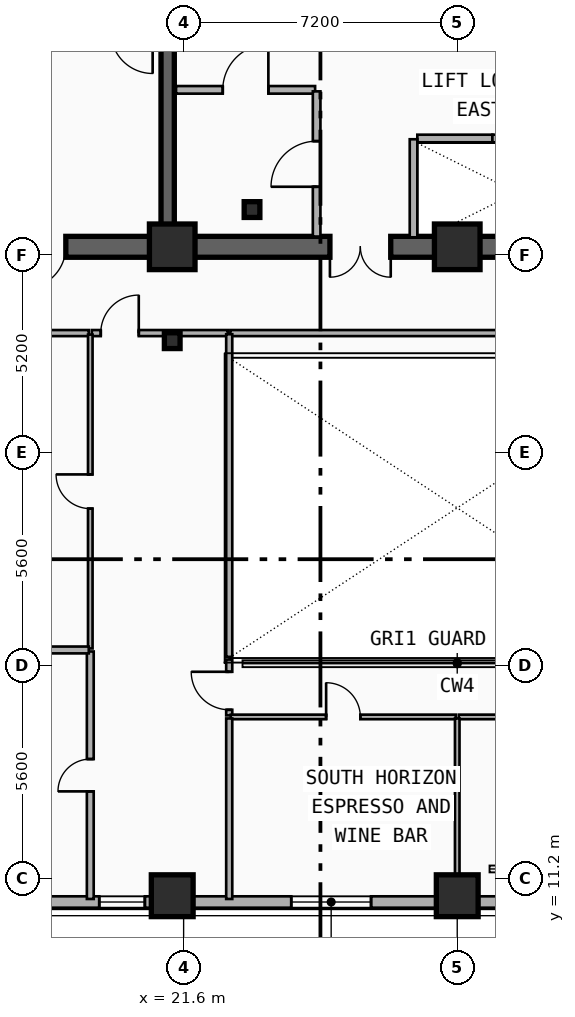
"""IFC4 building model, lengths in metres.
Left out: names, types, materials, properties, quantities, classifications, styles, units other than length and angle.
Written with IfcOpenShell. Run it as: python <this file> out.ifc"""

import sys

from ifc_helpers import new_model, si_unit, direction, frame, frame_2d, origin, origin_2d, place, context, subcontext, project, spatial, rectangle, i_section, extrude, element, fill, save


model = new_model("IFC4")
c1 = context("Model", 3, precision=1e-05, world=origin(), true_north=direction((0.0, 1.0)))
c2 = subcontext(c1, "Body", "Model", "MODEL_VIEW")
j1 = project(units=[si_unit("LENGTHUNIT", "METRE"), si_unit("PLANEANGLEUNIT", "RADIAN")], contexts=[c1])
p1 = place(None, origin())
s1 = spatial("IfcSite", under=j1, at=p1, CompositionType="ELEMENT")
p2 = place(p1, origin())
s2 = spatial("IfcBuilding", under=s1, at=p2, CompositionType="ELEMENT")
p3 = place(p2, frame((0.0, 0.0, 169.65)))
s3 = spatial("IfcBuildingStorey", under=s2, at=p3, CompositionType="ELEMENT", Elevation=169.65)
p4 = place(p3, frame((21.18, 27.82, 0.0), z_axis=(0.0, 0.0, 1.0), x_axis=(-1.0, 0.0, 0.0)))
e1 = element("IfcWall", 1, at=p4, inside=s3, PredefinedType="SHEAR", context=c2, shape_type="SweptSolid", body=[
    extrude(rectangle(XDim=9.03, YDim=0.55, at=frame_2d((4.515, 0.0))), origin(), (0.0, 0.0, 1.0), 3.55),
])
p5 = place(p4, frame((2.68, 0.0, 0.0)))
e2 = element("IfcOpeningElement", 2, at=p5, cuts=e1, PredefinedType="OPENING", context=c2, shape_type="SweptSolid", body=[
    extrude(rectangle(XDim=1.1, YDim=2.15, at=frame_2d((0.55, 1.075))), frame((0.0, 0.285, 0.0), z_axis=(0.0, -1.0, 0.0), x_axis=(1.0, 0.0, 0.0)), (0.0, 0.0, 1.0), 0.57),
])
p6 = place(p3, frame((33.15, 27.82, 0.0), z_axis=(0.0, 0.0, 1.0), x_axis=(-1.0, 0.0, 0.0)))
e3 = element("IfcWall", 3, at=p6, inside=s3, PredefinedType="SHEAR", context=c2, shape_type="SweptSolid", body=[
    extrude(rectangle(XDim=11.97, YDim=0.55, at=frame_2d((5.985, 0.0))), origin(), (0.0, 0.0, 1.0), 3.55),
])
p7 = place(p6, frame((6.1, 0.0, 0.0)))
e4 = element("IfcOpeningElement", 4, at=p7, cuts=e3, PredefinedType="OPENING", context=c2, shape_type="SweptSolid", body=[
    extrude(rectangle(XDim=1.6, YDim=2.2, at=frame_2d((0.8, 1.1))), frame((0.0, 0.285, 0.0), z_axis=(0.0, -1.0, 0.0), x_axis=(1.0, 0.0, 0.0)), (0.0, 0.0, 1.0), 0.57),
])
p8 = place(p3, frame((21.18, 28.095, 0.0), z_axis=(0.0, 0.0, 1.0), x_axis=(0.0, 1.0, 0.0)))
e5 = element("IfcWall", 5, at=p8, inside=s3, PredefinedType="SHEAR", context=c2, shape_type="SweptSolid", body=[
    extrude(rectangle(XDim=8.68, YDim=0.35, at=frame_2d((4.34, 0.0))), origin(), (0.0, 0.0, 1.0), 3.55),
])
p9 = place(p3, frame((23.4, 28.8, 0.0), z_axis=(0.0, 0.0, 1.0), x_axis=(1.0, 0.0, 0.0)))
e6 = element("IfcColumn", 6, at=p9, inside=s3, PredefinedType="COLUMN", context=c2, shape_type="SweptSolid", body=[
    extrude(i_section(OverallWidth=0.413, OverallDepth=0.415, WebThickness=0.03, FlangeThickness=0.047, FilletRadius=0.015, at=origin_2d()), origin(), (0.0, 0.0, 1.0), 3.55),
])
for number, where, z_axis, x_axis in (
    (7, (21.3, 27.82, 0.0), (0.0, 0.0, 1.0), (1.0, 0.0, 0.0)),
    (8, (28.8, 27.82, 0.0), (0.0, 0.0, 1.0), (1.0, 0.0, 0.0)),
):
    element("IfcColumn", number, at=place(p3, frame(where, z_axis=z_axis, x_axis=x_axis)), inside=s3, PredefinedType="COLUMN", context=c2, shape_type="SweptSolid", body=[
        extrude(rectangle(XDim=1.2, YDim=1.2, at=origin_2d()), origin(), (0.0, 0.0, 1.0), 3.55),
    ])
p10 = place(p3, frame((21.3, 25.35, 0.0), z_axis=(0.0, 0.0, 1.0), x_axis=(1.0, 0.0, 0.0)))
e9 = element("IfcColumn", 9, at=p10, inside=s3, PredefinedType="COLUMN", context=c2, shape_type="SweptSolid", body=[
    extrude(i_section(OverallWidth=0.413, OverallDepth=0.415, WebThickness=0.03, FlangeThickness=0.047, FilletRadius=0.015, at=origin_2d()), origin(), (0.0, 0.0, 1.0), 3.55),
])
for number, where, z_axis, x_axis in (
    (10, (21.3, 10.854, 0.0), (0.0, -0.09, 0.996), (1.0, 0.0, 0.0)),
    (11, (28.8, 10.854, 0.0), (0.0, -0.09, 0.996), (1.0, 0.0, 0.0)),
):
    element("IfcColumn", number, at=place(p3, frame(where, z_axis=z_axis, x_axis=x_axis)), inside=s3, PredefinedType="COLUMN", context=c2, shape_type="SweptSolid", body=[
        extrude(rectangle(XDim=1.1, YDim=1.1, at=origin_2d()), origin(), (0.0, 0.0, 1.0), 3.565),
    ])
p11 = place(p3, frame((48.0, 10.58, 0.0), z_axis=(0.0, 0.0, 1.0), x_axis=(-1.0, 0.0, 0.0)))
e12 = element("IfcWall", 12, at=p11, inside=s3, PredefinedType="SOLIDWALL", context=c2, shape_type="SweptSolid", body=[
    extrude(rectangle(XDim=38.4, YDim=0.3, at=frame_2d((19.2, 0.0))), origin(), (0.0, 0.0, 1.0), 2.91),
])
p12 = place(p11, frame((33.665, 0.0, 1.22)))
e13 = element("IfcOpeningElement", 13, at=p12, cuts=e12, PredefinedType="OPENING", context=c2, shape_type="SweptSolid", body=[
    extrude(rectangle(XDim=1.2, YDim=1.5, at=frame_2d((0.6, 0.75))), frame((0.0, 0.16, 0.0), z_axis=(0.0, -1.0, 0.0), x_axis=(1.0, 0.0, 0.0)), (0.0, 0.0, 1.0), 0.32),
])
p13 = place(p11, frame((21.468, 0.0, 0.63)))
e14 = element("IfcOpeningElement", 14, at=p13, cuts=e12, PredefinedType="OPENING", context=c2, shape_type="SweptSolid", body=[
    extrude(rectangle(XDim=2.1, YDim=2.1, at=frame_2d((1.05, 1.05))), frame((0.0, 0.16, 0.0), z_axis=(0.0, -1.0, 0.0), x_axis=(1.0, 0.0, 0.0)), (0.0, 0.0, 1.0), 0.32),
])
p14 = place(p11, frame((14.375, 0.0, 0.63)))
e15 = element("IfcOpeningElement", 15, at=p14, cuts=e12, PredefinedType="OPENING", context=c2, shape_type="SweptSolid", body=[
    extrude(rectangle(XDim=2.1, YDim=2.1, at=frame_2d((1.05, 1.05))), frame((0.0, 0.16, 0.0), z_axis=(0.0, -1.0, 0.0), x_axis=(1.0, 0.0, 0.0)), (0.0, 0.0, 1.0), 0.32),
])
p15 = place(p11, frame((3.535, 0.0, 0.65)))
e16 = element("IfcOpeningElement", 16, at=p15, cuts=e12, PredefinedType="OPENING", context=c2, shape_type="SweptSolid", body=[
    extrude(rectangle(XDim=1.2, YDim=1.5, at=frame_2d((0.6, 0.75))), frame((0.0, 0.16, 0.0), z_axis=(0.0, -1.0, 0.0), x_axis=(1.0, 0.0, 0.0)), (0.0, 0.0, 1.0), 0.32),
])
p16 = place(p11, frame((27.42, 0.0, 0.75)))
e17 = element("IfcOpeningElement", 17, at=p16, cuts=e12, PredefinedType="OPENING", context=c2, shape_type="SweptSolid", body=[
    extrude(rectangle(XDim=1.2, YDim=1.5, at=frame_2d((0.6, 0.75))), frame((0.0, 0.16, 0.0), z_axis=(0.0, -1.0, 0.0), x_axis=(1.0, 0.0, 0.0)), (0.0, 0.0, 1.0), 0.32),
])
p17 = place(p3, frame((27.75, 30.67, 0.0), z_axis=(0.0, 0.0, 1.0), x_axis=(1.0, 0.0, 0.0)))
e18 = element("IfcWall", 18, at=p17, inside=s3, PredefinedType="PARTITIONING", context=c2, shape_type="SweptSolid", body=[
    extrude(rectangle(XDim=1.975, YDim=0.2, at=frame_2d((0.988, 0.0))), origin(), (0.0, 0.0, 1.0), 2.36),
])
p18 = place(p3, frame((27.65, 28.07, 0.0), z_axis=(0.0, 0.0, 1.0), x_axis=(0.0, 1.0, 0.0)))
e19 = element("IfcWall", 19, at=p18, inside=s3, PredefinedType="PARTITIONING", context=c2, shape_type="SweptSolid", body=[
    extrude(rectangle(XDim=2.58, YDim=0.2, at=frame_2d((1.29, 0.0))), origin(), (0.0, 0.0, 1.0), 2.36),
])
p19 = place(p3, frame((29.725, 30.67, 0.0), z_axis=(0.0, 0.0, 1.0), x_axis=(1.0, 0.0, 0.0)))
e20 = element("IfcWall", 20, at=p19, inside=s3, PredefinedType="PARTITIONING", context=c2, shape_type="SweptSolid", body=[
    extrude(rectangle(XDim=2.05, YDim=0.2, at=frame_2d((1.025, 0.0))), origin(), (0.0, 0.0, 1.0), 2.67),
])
p20 = place(p3, frame((21.4, 31.95, 0.0), z_axis=(0.0, 0.0, 1.0), x_axis=(1.0, 0.0, 0.0)))
e21 = element("IfcWall", 21, at=p20, inside=s3, PredefinedType="PARTITIONING", context=c2, shape_type="SweptSolid", body=[
    extrude(rectangle(XDim=3.66, YDim=0.2, at=frame_2d((1.83, 0.0))), origin(), (0.0, 0.0, 1.0), 2.36),
])
p21 = place(p20, frame((1.23, 0.0, 0.0)))
e22 = element("IfcOpeningElement", 22, at=p21, cuts=e21, PredefinedType="OPENING", context=c2, shape_type="SweptSolid", body=[
    extrude(rectangle(XDim=1.2, YDim=2.15, at=frame_2d((0.6, 1.075))), frame((0.0, 0.11, 0.0), z_axis=(0.0, -1.0, 0.0), x_axis=(1.0, 0.0, 0.0)), (0.0, 0.0, 1.0), 0.22),
])
p22 = place(p3, frame((25.1, 28.09, 0.0), z_axis=(0.0, 0.0, 1.0), x_axis=(0.0, 1.0, 0.0)))
e23 = element("IfcWall", 23, at=p22, inside=s3, PredefinedType="PARTITIONING", context=c2, shape_type="SweptSolid", body=[
    extrude(rectangle(XDim=3.82, YDim=0.2, at=frame_2d((1.91, 0.0))), origin(), (0.0, 0.0, 1.0), 2.67),
])
p23 = place(p22, frame((1.31, 0.0, 0.0)))
e24 = element("IfcOpeningElement", 24, at=p23, cuts=e23, PredefinedType="OPENING", context=c2, shape_type="SweptSolid", body=[
    extrude(rectangle(XDim=1.2, YDim=2.15, at=frame_2d((0.6, 1.075))), frame((0.0, 0.11, 0.0), z_axis=(0.0, -1.0, 0.0), x_axis=(1.0, 0.0, 0.0)), (0.0, 0.0, 1.0), 0.22),
])
p24 = place(p3, frame((19.184, 25.55, 0.0), z_axis=(0.0, 0.0, 1.0), x_axis=(1.0, 0.0, 0.0)))
e25 = element("IfcWall", 25, at=p24, inside=s3, PredefinedType="PARTITIONING", context=c2, shape_type="SweptSolid", body=[
    extrude(rectangle(XDim=3.576, YDim=0.16, at=frame_2d((1.788, 0.0))), origin(), (0.0, 0.0, 1.0), 2.36),
])
p25 = place(p24, frame((0.236, 0.0, 0.0)))
e26 = element("IfcOpeningElement", 26, at=p25, cuts=e25, PredefinedType="OPENING", context=c2, shape_type="SweptSolid", body=[
    extrude(rectangle(XDim=1.0, YDim=2.15, at=frame_2d((0.5, 1.075))), frame((0.0, 0.09, 0.0), z_axis=(0.0, -1.0, 0.0), x_axis=(1.0, 0.0, 0.0)), (0.0, 0.0, 1.0), 0.18),
])
p26 = place(p3, frame((17.434, 25.55, 0.0), z_axis=(0.0, 0.0, 1.0), x_axis=(1.0, 0.0, 0.0)))
e27 = element("IfcWall", 27, at=p26, inside=s3, PredefinedType="PARTITIONING", context=c2, shape_type="SweptSolid", body=[
    extrude(rectangle(XDim=1.67, YDim=0.16, at=frame_2d((0.835, 0.0))), origin(), (0.0, 0.0, 1.0), 3.29),
])
p27 = place(p3, frame((22.8, 15.49, 0.0), z_axis=(0.0, 0.0, 1.0), x_axis=(0.0, 1.0, 0.0)))
e28 = element("IfcWall", 28, at=p27, inside=s3, PredefinedType="PARTITIONING", context=c2, shape_type="SweptSolid", body=[
    extrude(rectangle(XDim=1.47, YDim=0.16, at=frame_2d((0.735, 0.0))), origin(), (0.0, 0.0, 1.0), 2.73),
])
p28 = place(p27, frame((0.148, 0.0, 0.0)))
e29 = element("IfcOpeningElement", 29, at=p28, cuts=e28, PredefinedType="OPENING", context=c2, shape_type="SweptSolid", body=[
    extrude(rectangle(XDim=1.0, YDim=2.15, at=frame_2d((0.5, 1.075))), frame((0.0, 0.09, 0.0), z_axis=(0.0, -1.0, 0.0), x_axis=(1.0, 0.0, 0.0)), (0.0, 0.0, 1.0), 0.18),
])
p29 = place(p3, frame((22.84, 15.45, 0.0), z_axis=(0.0, 0.0, 1.0), x_axis=(1.0, 0.0, 0.0)))
e30 = element("IfcWall", 30, at=p29, inside=s3, PredefinedType="PARTITIONING", context=c2, shape_type="SweptSolid", body=[
    extrude(rectangle(XDim=5.92, YDim=0.12, at=frame_2d((2.96, 0.0))), origin(), (0.0, 0.0, 1.0), 2.36),
])
p30 = place(p29, frame((2.51, 0.0, 0.0)))
e31 = element("IfcOpeningElement", 31, at=p30, cuts=e30, PredefinedType="OPENING", context=c2, shape_type="SweptSolid", body=[
    extrude(rectangle(XDim=0.9, YDim=2.1, at=frame_2d((0.45, 1.05))), frame((0.0, 0.07, 0.0), z_axis=(0.0, -1.0, 0.0), x_axis=(1.0, 0.0, 0.0)), (0.0, 0.0, 1.0), 0.14),
])
p31 = place(p3, frame((28.84, 15.45, 0.0), z_axis=(0.0, 0.0, 1.0), x_axis=(1.0, 0.0, 0.0)))
e32 = element("IfcWall", 32, at=p31, inside=s3, PredefinedType="PARTITIONING", context=c2, shape_type="SweptSolid", body=[
    extrude(rectangle(XDim=7.47, YDim=0.12, at=frame_2d((3.735, 0.0))), origin(), (0.0, 0.0, 1.0), 2.36),
])
p32 = place(p31, frame((3.285, 0.0, 0.0)))
e33 = element("IfcOpeningElement", 33, at=p32, cuts=e32, PredefinedType="OPENING", context=c2, shape_type="SweptSolid", body=[
    extrude(rectangle(XDim=0.9, YDim=2.1, at=frame_2d((0.45, 1.05))), frame((0.0, 0.07, 0.0), z_axis=(0.0, -1.0, 0.0), x_axis=(1.0, 0.0, 0.0)), (0.0, 0.0, 1.0), 0.14),
])
p33 = place(p3, frame((19.144, 10.66, 0.0), z_axis=(0.0, 0.0, 1.0), x_axis=(0.0, 1.0, 0.0)))
e34 = element("IfcWall", 34, at=p33, inside=s3, PredefinedType="PLUMBINGWALL", context=c2, shape_type="SweptSolid", body=[
    extrude(rectangle(XDim=6.512, YDim=0.18, at=frame_2d((3.256, 0.0))), origin(), (0.0, 0.0, 1.0), 2.83),
])
p34 = place(p33, frame((2.831, 0.0, 0.0)))
e35 = element("IfcOpeningElement", 35, at=p34, cuts=e34, PredefinedType="OPENING", context=c2, shape_type="SweptSolid", body=[
    extrude(rectangle(XDim=0.85, YDim=2.1, at=frame_2d((0.425, 1.05))), frame((0.0, 0.1, 0.0), z_axis=(0.0, -1.0, 0.0), x_axis=(1.0, 0.0, 0.0)), (0.0, 0.0, 1.0), 0.2),
])
p35 = place(p3, frame((19.144, 17.252, 0.0), z_axis=(0.0, 0.0, 1.0), x_axis=(0.0, 1.0, 0.0)))
e36 = element("IfcWall", 36, at=p35, inside=s3, PredefinedType="PARTITIONING", context=c2, shape_type="SweptSolid", body=[
    extrude(rectangle(XDim=8.258, YDim=0.12, at=frame_2d((4.129, 0.0))), origin(), (0.0, 0.0, 1.0), 2.83),
])
p36 = place(p35, frame((3.679, 0.0, 0.0)))
e37 = element("IfcOpeningElement", 37, at=p36, cuts=e36, PredefinedType="OPENING", context=c2, shape_type="SweptSolid", body=[
    extrude(rectangle(XDim=0.9, YDim=2.1, at=frame_2d((0.45, 1.05))), frame((0.0, 0.07, 0.0), z_axis=(0.0, -1.0, 0.0), x_axis=(1.0, 0.0, 0.0)), (0.0, 0.0, 1.0), 0.14),
])
p37 = place(p3, frame((22.8, 10.66, 0.0), z_axis=(0.0, 0.0, 1.0), x_axis=(0.0, 1.0, 0.0)))
e38 = element("IfcWall", 38, at=p37, inside=s3, PredefinedType="PARTITIONING", context=c2, shape_type="SweptSolid", body=[
    extrude(rectangle(XDim=4.75, YDim=0.16, at=frame_2d((2.375, 0.0))), origin(), (0.0, 0.0, 1.0), 2.91),
])
p38 = place(p3, frame((17.434, 17.212, 0.0), z_axis=(0.0, 0.0, 1.0), x_axis=(1.0, 0.0, 0.0)))
e39 = element("IfcWall", 39, at=p38, inside=s3, PredefinedType="PLUMBINGWALL", context=c2, shape_type="SweptSolid", body=[
    extrude(rectangle(XDim=1.67, YDim=0.18, at=frame_2d((0.835, 0.0))), origin(), (0.0, 0.0, 1.0), 3.29),
])
p39 = place(p3, frame((28.8, 10.66, 0.0), z_axis=(0.0, 0.0, 1.0), x_axis=(0.0, 1.0, 0.0)))
e40 = element("IfcWall", 40, at=p39, inside=s3, PredefinedType="PARTITIONING", context=c2, shape_type="SweptSolid", body=[
    extrude(rectangle(XDim=4.75, YDim=0.12, at=frame_2d((2.375, 0.0))), origin(), (0.0, 0.0, 1.0), 2.36),
])
p40 = place(p3, frame((22.83, 25.55, 0.0), z_axis=(0.0, 0.0, 1.0), x_axis=(1.0, 0.0, 0.0)))
e41 = element("IfcWall", 41, at=p40, inside=s3, PredefinedType="PARTITIONING", context=c2, shape_type="SweptSolid", body=[
    extrude(rectangle(XDim=13.49, YDim=0.16, at=frame_2d((6.745, 0.0))), origin(), (0.0, 0.0, 1.0), 2.36),
])
p41 = place(p3, frame((22.8, 17.03, 0.0), z_axis=(0.0, 0.0, 1.0), x_axis=(0.0, 1.0, 0.0)))
e42 = element("IfcWall", 42, at=p41, inside=s3, PredefinedType="PARTITIONING", context=c2, shape_type="SweptSolid", body=[
    extrude(rectangle(XDim=8.49, YDim=0.16, at=frame_2d((4.245, 0.0))), origin(), (0.0, 0.0, 1.0), 2.73),
])
p42 = place(p13, origin())
e43 = element("IfcWindow", 43, at=p42, inside=s3, PartitioningType="SINGLE_PANEL", PredefinedType="WINDOW", context=c2, shape_type="SweptSolid", body=[
    extrude(rectangle(XDim=2.1, YDim=2.1, at=frame_2d((1.05, 1.05))), frame((0.0, 0.03, 0.0), z_axis=(0.0, -1.0, 0.0), x_axis=(1.0, 0.0, 0.0)), (0.0, 0.0, 1.0), 0.06),
])
fill(e14, e43)
p43 = place(p16, origin())
e44 = element("IfcWindow", 44, at=p43, inside=s3, PartitioningType="SINGLE_PANEL", PredefinedType="WINDOW", context=c2, shape_type="SweptSolid", body=[
    extrude(rectangle(XDim=1.2, YDim=1.5, at=frame_2d((0.6, 0.75))), frame((0.0, 0.03, 0.0), z_axis=(0.0, -1.0, 0.0), x_axis=(1.0, 0.0, 0.0)), (0.0, 0.0, 1.0), 0.06),
])
fill(e17, e44)
p44 = place(p5, origin())
e45 = element("IfcDoor", 45, at=p44, inside=s3, OperationType="SINGLE_SWING_RIGHT", PredefinedType="DOOR", context=c2, shape_type="SweptSolid", body=[
    extrude(rectangle(XDim=1.1, YDim=2.15, at=frame_2d((0.55, 1.075))), frame((0.0, 0.025, 0.0), z_axis=(0.0, -1.0, 0.0), x_axis=(1.0, 0.0, 0.0)), (0.0, 0.0, 1.0), 0.05),
])
fill(e2, e45)
p45 = place(p7, origin())
e46 = element("IfcDoor", 46, at=p45, inside=s3, OperationType="SINGLE_SWING_LEFT", PredefinedType="DOOR", context=c2, shape_type="SweptSolid", body=[
    extrude(rectangle(XDim=1.6, YDim=2.2, at=frame_2d((0.8, 1.1))), frame((0.0, 0.025, 0.0), z_axis=(0.0, -1.0, 0.0), x_axis=(1.0, 0.0, 0.0)), (0.0, 0.0, 1.0), 0.05),
])
fill(e4, e46)
p46 = place(p21, origin())
e47 = element("IfcDoor", 47, at=p46, inside=s3, OperationType="SINGLE_SWING_RIGHT", PredefinedType="DOOR", context=c2, shape_type="SweptSolid", body=[
    extrude(rectangle(XDim=1.2, YDim=2.15, at=frame_2d((0.6, 1.075))), frame((0.0, 0.025, 0.0), z_axis=(0.0, -1.0, 0.0), x_axis=(1.0, 0.0, 0.0)), (0.0, 0.0, 1.0), 0.05),
])
fill(e22, e47)
p47 = place(p23, origin())
e48 = element("IfcDoor", 48, at=p47, inside=s3, OperationType="SINGLE_SWING_LEFT", PredefinedType="DOOR", context=c2, shape_type="SweptSolid", body=[
    extrude(rectangle(XDim=1.2, YDim=2.15, at=frame_2d((0.6, 1.075))), frame((0.0, 0.025, 0.0), z_axis=(0.0, -1.0, 0.0), x_axis=(1.0, 0.0, 0.0)), (0.0, 0.0, 1.0), 0.05),
])
fill(e24, e48)
p48 = place(p25, origin())
e49 = element("IfcDoor", 49, at=p48, inside=s3, OperationType="SINGLE_SWING_RIGHT", PredefinedType="DOOR", context=c2, shape_type="SweptSolid", body=[
    extrude(rectangle(XDim=1.0, YDim=2.15, at=frame_2d((0.5, 1.075))), frame((0.0, 0.025, 0.0), z_axis=(0.0, -1.0, 0.0), x_axis=(1.0, 0.0, 0.0)), (0.0, 0.0, 1.0), 0.05),
])
fill(e26, e49)
p49 = place(p28, origin())
e50 = element("IfcDoor", 50, at=p49, inside=s3, OperationType="SINGLE_SWING_RIGHT", PredefinedType="DOOR", context=c2, shape_type="SweptSolid", body=[
    extrude(rectangle(XDim=1.0, YDim=2.15, at=frame_2d((0.5, 1.075))), frame((0.0, 0.025, 0.0), z_axis=(0.0, -1.0, 0.0), x_axis=(1.0, 0.0, 0.0)), (0.0, 0.0, 1.0), 0.05),
])
fill(e29, e50)
p50 = place(p30, origin())
e51 = element("IfcDoor", 51, at=p50, inside=s3, OperationType="SINGLE_SWING_LEFT", PredefinedType="DOOR", context=c2, shape_type="SweptSolid", body=[
    extrude(rectangle(XDim=0.9, YDim=2.1, at=frame_2d((0.45, 1.05))), frame((0.0, 0.025, 0.0), z_axis=(0.0, -1.0, 0.0), x_axis=(1.0, 0.0, 0.0)), (0.0, 0.0, 1.0), 0.05),
])
fill(e31, e51)
p51 = place(p34, origin())
e52 = element("IfcDoor", 52, at=p51, inside=s3, OperationType="SINGLE_SWING_LEFT", PredefinedType="DOOR", context=c2, shape_type="SweptSolid", body=[
    extrude(rectangle(XDim=0.85, YDim=2.1, at=frame_2d((0.425, 1.05))), frame((0.0, 0.025, 0.0), z_axis=(0.0, -1.0, 0.0), x_axis=(1.0, 0.0, 0.0)), (0.0, 0.0, 1.0), 0.05),
])
fill(e35, e52)
p52 = place(p36, origin())
e53 = element("IfcDoor", 53, at=p52, inside=s3, OperationType="SINGLE_SWING_RIGHT", PredefinedType="DOOR", context=c2, shape_type="SweptSolid", body=[
    extrude(rectangle(XDim=0.9, YDim=2.1, at=frame_2d((0.45, 1.05))), frame((0.0, 0.025, 0.0), z_axis=(0.0, -1.0, 0.0), x_axis=(1.0, 0.0, 0.0)), (0.0, 0.0, 1.0), 0.05),
])
fill(e37, e53)
save(model, sys.argv[1])
